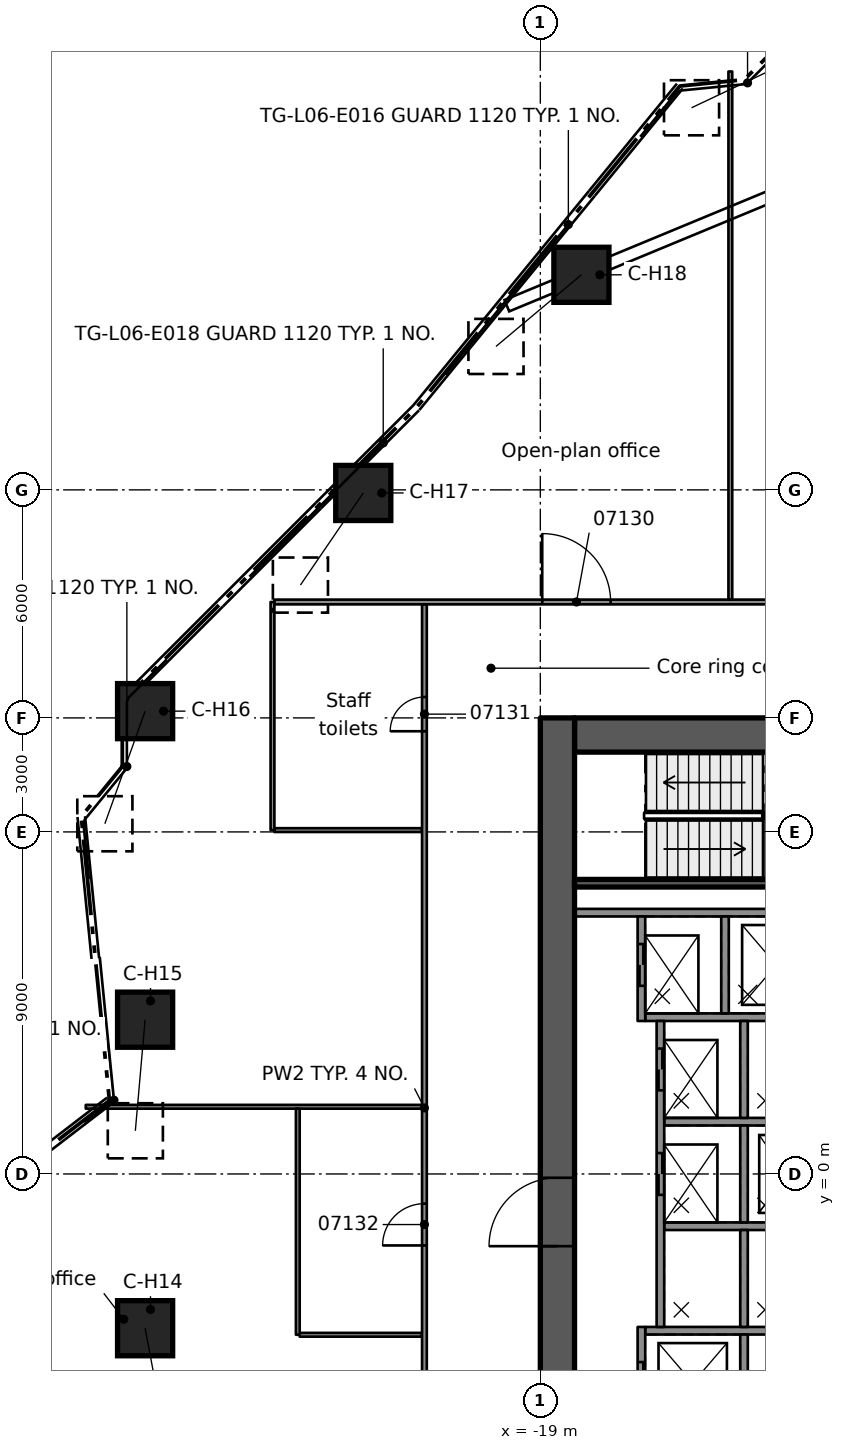
"""IFC4 building model, lengths in metres.
Left out: names, types, materials, properties, quantities, classifications, styles, units other than length and angle.
Written with IfcOpenShell. Run it as: python <this file> out.ifc"""

import sys

from ifc_helpers import new_model, si_unit, direction, frame, frame_2d, origin, origin_2d, place, context, subcontext, project, spatial, rectangle, extrude, element, fill, save


model = new_model("IFC4")
c1 = context("Model", 3, precision=1e-05, world=origin(), true_north=direction((0.0, 1.0)))
c2 = subcontext(c1, "Body", "Model", "MODEL_VIEW")
j1 = project(units=[si_unit("LENGTHUNIT", "METRE"), si_unit("PLANEANGLEUNIT", "RADIAN")], contexts=[c1])
p1 = place(None, origin())
s1 = spatial("IfcSite", under=j1, at=p1, CompositionType="ELEMENT")
p2 = place(p1, origin())
s2 = spatial("IfcBuilding", under=s1, at=p2, CompositionType="ELEMENT")
p3 = place(p2, frame((0.0, 0.0, 33.3)))
s3 = spatial("IfcBuildingStorey", under=s2, at=p3, CompositionType="ELEMENT", Elevation=33.3)
p4 = place(p3, frame((-18.1, 11.55, 0.0), z_axis=(0.0, 0.0, 1.0), x_axis=(1.0, 0.0, 0.0)))
e1 = element("IfcWall", 1, at=p4, inside=s3, PredefinedType="SHEAR", context=c2, shape_type="SweptSolid", body=[
    extrude(rectangle(XDim=9.2, YDim=0.9, at=frame_2d((4.6, 0.0))), origin(), (0.0, 0.0, 1.0), 4.0),
])
p5 = place(p4, frame((5.1, 0.0, 0.0)))
e2 = element("IfcOpeningElement", 2, at=p5, cuts=e1, PredefinedType="OPENING", context=c2, shape_type="SweptSolid", body=[
    extrude(rectangle(XDim=1.1, YDim=2.1, at=frame_2d((0.55, 1.05))), frame((0.0, 0.46, 0.0), z_axis=(0.0, -1.0, 0.0), x_axis=(1.0, 0.0, 0.0)), (0.0, 0.0, 1.0), 0.92),
])
p6 = place(p3, frame((-18.55, -12.0, 0.0), z_axis=(0.0, 0.0, 1.0), x_axis=(0.0, 1.0, 0.0)))
e3 = element("IfcWall", 3, at=p6, inside=s3, PredefinedType="SHEAR", context=c2, shape_type="SweptSolid", body=[
    extrude(rectangle(XDim=24.0, YDim=0.9, at=frame_2d((12.0, 0.0))), origin(), (0.0, 0.0, 1.0), 4.0),
])
p7 = place(p6, frame((10.1, 0.0, 0.0)))
e4 = element("IfcOpeningElement", 4, at=p7, cuts=e3, PredefinedType="OPENING", context=c2, shape_type="SweptSolid", body=[
    extrude(rectangle(XDim=1.8, YDim=2.1, at=frame_2d((0.9, 1.05))), frame((0.0, 0.46, 0.0), z_axis=(0.0, -1.0, 0.0), x_axis=(1.0, 0.0, 0.0)), (0.0, 0.0, 1.0), 0.92),
])
p8 = place(p3, frame((-29.4, -4.059, 0.508), z_axis=(0.130006651481, -0.68901191234, 0.712994288353), x_axis=(0.98266050942, 0.185413924034, 0.0)))
e5 = element("IfcColumn", 5, at=p8, inside=s3, PredefinedType="COLUMN", context=c2, shape_type="SweptSolid", body=[
    extrude(rectangle(XDim=1.45, YDim=1.45, at=origin_2d()), origin(), (0.0, 0.0, 1.0), 4.184),
])
p9 = place(p3, frame((-29.4, 4.059, 0.508), z_axis=(-0.061436713661, -0.698558188668, 0.712910925193), x_axis=(0.99615487667, -0.08760971228, 0.0)))
e6 = element("IfcColumn", 6, at=p9, inside=s3, PredefinedType="COLUMN", context=c2, shape_type="SweptSolid", body=[
    extrude(rectangle(XDim=1.45, YDim=1.45, at=origin_2d()), origin(), (0.0, 0.0, 1.0), 4.185),
])
p10 = place(p3, frame((-29.4, 12.178, 0.53), z_axis=(-0.24591316534, -0.687967306264, 0.682808685229), x_axis=(0.941650592778, -0.33659198018, 0.0)))
e7 = element("IfcColumn", 7, at=p10, inside=s3, PredefinedType="COLUMN", context=c2, shape_type="SweptSolid", body=[
    extrude(rectangle(XDim=1.45, YDim=1.45, at=origin_2d()), origin(), (0.0, 0.0, 1.0), 4.307),
])
p11 = place(p3, frame((-23.659, 17.919, 0.508), z_axis=(-0.395280825563, -0.579239562537, 0.712905742812), x_axis=(0.825998448397, -0.563672389997, 0.0)))
e8 = element("IfcColumn", 8, at=p11, inside=s3, PredefinedType="COLUMN", context=c2, shape_type="SweptSolid", body=[
    extrude(rectangle(XDim=1.45, YDim=1.45, at=origin_2d()), origin(), (0.0, 0.0, 1.0), 4.185),
])
p12 = place(p3, frame((-17.919, 23.659, 0.508), z_axis=(-0.537268679687, -0.450505155937, 0.713012952408), x_axis=(0.642522431446, -0.766266875891, 0.0)))
e9 = element("IfcColumn", 9, at=p12, inside=s3, PredefinedType="COLUMN", context=c2, shape_type="SweptSolid", body=[
    extrude(rectangle(XDim=1.45, YDim=1.45, at=origin_2d()), origin(), (0.0, 0.0, 1.0), 4.184),
])
p13 = place(p3, frame((-12.178, 29.4, 0.53), z_axis=(-0.660215598589, -0.312560635038, 0.682950373603), x_axis=(0.427892823623, -0.903829481424, 0.0)))
e10 = element("IfcColumn", 10, at=p13, inside=s3, PredefinedType="COLUMN", context=c2, shape_type="SweptSolid", body=[
    extrude(rectangle(XDim=1.45, YDim=1.45, at=origin_2d()), origin(), (0.0, 0.0, 1.0), 4.306),
])
p14 = place(p3, frame((-11.54, 6.875, 0.0), z_axis=(0.0, 0.0, 1.0), x_axis=(-1.0, 0.0, 0.0)))
e11 = element("IfcWall", 11, at=p14, inside=s3, PredefinedType="SOLIDWALL", context=c2, shape_type="SweptSolid", body=[
    extrude(rectangle(XDim=6.56, YDim=0.2, at=frame_2d((3.28, 0.0))), origin(), (0.0, 0.0, 1.0), 3.58),
])
p15 = place(p3, frame((-11.54, -4.125, 0.0), z_axis=(0.0, 0.0, 1.0), x_axis=(-1.0, 0.0, 0.0)))
e12 = element("IfcWall", 12, at=p15, inside=s3, PredefinedType="SOLIDWALL", context=c2, shape_type="SweptSolid", body=[
    extrude(rectangle(XDim=4.7, YDim=0.2, at=frame_2d((2.35, 0.0))), origin(), (0.0, 0.0, 1.0), 3.58),
])
for number, where, z_axis, x_axis in (
    (13, (-11.54, -1.375, 0.0), (0.0, 0.0, 1.0), (-1.0, 0.0, 0.0)),
    (14, (-11.54, 1.375, 0.0), (0.0, 0.0, 1.0), (-1.0, 0.0, 0.0)),
):
    element("IfcWall", number, at=place(p3, frame(where, z_axis=z_axis, x_axis=x_axis)), inside=s3, PredefinedType="SOLIDWALL", context=c2, shape_type="SweptSolid", body=[
        extrude(rectangle(XDim=4.2, YDim=0.2, at=frame_2d((2.1, 0.0))), origin(), (0.0, 0.0, 1.0), 3.58),
    ])
p16 = place(p3, frame((-11.54, 4.125, 0.0), z_axis=(0.0, 0.0, 1.0), x_axis=(-1.0, 0.0, 0.0)))
e15 = element("IfcWall", 15, at=p16, inside=s3, PredefinedType="SOLIDWALL", context=c2, shape_type="SweptSolid", body=[
    extrude(rectangle(XDim=4.7, YDim=0.2, at=frame_2d((2.35, 0.0))), origin(), (0.0, 0.0, 1.0), 3.58),
])
for number, where, z_axis, x_axis in (
    (16, (-13.64, -6.775, 0.0), (0.0, 0.0, 1.0), (0.0, 1.0, 0.0)),
    (17, (-13.64, -4.025, 0.0), (0.0, 0.0, 1.0), (0.0, 1.0, 0.0)),
    (18, (-13.64, -1.275, 0.0), (0.0, 0.0, 1.0), (0.0, 1.0, 0.0)),
    (19, (-13.64, 1.475, 0.0), (0.0, 0.0, 1.0), (0.0, 1.0, 0.0)),
    (20, (-14.14, 4.225, 0.0), (0.0, 0.0, 1.0), (0.0, 1.0, 0.0)),
):
    element("IfcWall", number, at=place(p3, frame(where, z_axis=z_axis, x_axis=x_axis)), inside=s3, PredefinedType="SOLIDWALL", context=c2, shape_type="SweptSolid", body=[
        extrude(rectangle(XDim=2.55, YDim=0.2, at=frame_2d((1.275, 0.0))), origin(), (0.0, 0.0, 1.0), 3.58),
    ])
p17 = place(p3, frame((-16.34, -6.775, 0.0), z_axis=(0.0, 0.0, 1.0), x_axis=(0.0, 1.0, 0.0)))
e21 = element("IfcWall", 21, at=p17, inside=s3, PredefinedType="SOLIDWALL", context=c2, shape_type="SweptSolid", body=[
    extrude(rectangle(XDim=2.75, YDim=0.2, at=frame_2d((1.375, 0.0))), origin(), (0.0, 0.0, 1.0), 3.58),
])
p18 = place(p17, frame((0.725, 0.0, 0.0)))
e22 = element("IfcOpeningElement", 22, at=p18, cuts=e21, PredefinedType="OPENING", context=c2, shape_type="SweptSolid", body=[
    extrude(rectangle(XDim=1.1, YDim=2.1, at=frame_2d((0.55, 1.05))), frame((0.0, 0.11, 0.0), z_axis=(0.0, -1.0, 0.0), x_axis=(1.0, 0.0, 0.0)), (0.0, 0.0, 1.0), 0.22),
])
p19 = place(p3, frame((-15.84, -4.025, 0.0), z_axis=(0.0, 0.0, 1.0), x_axis=(0.0, 1.0, 0.0)))
e23 = element("IfcWall", 23, at=p19, inside=s3, PredefinedType="SOLIDWALL", context=c2, shape_type="SweptSolid", body=[
    extrude(rectangle(XDim=8.05, YDim=0.2, at=frame_2d((4.025, 0.0))), origin(), (0.0, 0.0, 1.0), 3.58),
])
p20 = place(p19, frame((3.475, 0.0, 0.0)))
e24 = element("IfcOpeningElement", 24, at=p20, cuts=e23, PredefinedType="OPENING", context=c2, shape_type="SweptSolid", body=[
    extrude(rectangle(XDim=1.1, YDim=2.1, at=frame_2d((0.55, 1.05))), frame((0.0, 0.11, 0.0), z_axis=(0.0, -1.0, 0.0), x_axis=(1.0, 0.0, 0.0)), (0.0, 0.0, 1.0), 0.22),
])
p21 = place(p19, frame((6.225, 0.0, 0.0)))
e25 = element("IfcOpeningElement", 25, at=p21, cuts=e23, PredefinedType="OPENING", context=c2, shape_type="SweptSolid", body=[
    extrude(rectangle(XDim=1.1, YDim=2.1, at=frame_2d((0.55, 1.05))), frame((0.0, 0.11, 0.0), z_axis=(0.0, -1.0, 0.0), x_axis=(1.0, 0.0, 0.0)), (0.0, 0.0, 1.0), 0.22),
])
p22 = place(p3, frame((-16.34, 4.025, 0.0), z_axis=(0.0, 0.0, 1.0), x_axis=(0.0, 1.0, 0.0)))
e26 = element("IfcWall", 26, at=p22, inside=s3, PredefinedType="SOLIDWALL", context=c2, shape_type="SweptSolid", body=[
    extrude(rectangle(XDim=2.75, YDim=0.2, at=frame_2d((1.375, 0.0))), origin(), (0.0, 0.0, 1.0), 3.58),
])
p23 = place(p22, frame((0.925, 0.0, 0.0)))
e27 = element("IfcOpeningElement", 27, at=p23, cuts=e26, PredefinedType="OPENING", context=c2, shape_type="SweptSolid", body=[
    extrude(rectangle(XDim=1.1, YDim=2.1, at=frame_2d((0.55, 1.05))), frame((0.0, 0.11, 0.0), z_axis=(0.0, -1.0, 0.0), x_axis=(1.0, 0.0, 0.0)), (0.0, 0.0, 1.0), 0.22),
])
p24 = place(p3, frame((-11.54, 7.65, 0.0), z_axis=(0.0, 0.0, 1.0), x_axis=(-1.0, 0.0, 0.0)))
e28 = element("IfcWall", 28, at=p24, inside=s3, PredefinedType="SOLIDWALL", context=c2, shape_type="SweptSolid", body=[
    extrude(rectangle(XDim=6.56, YDim=0.2, at=frame_2d((3.28, 0.0))), origin(), (0.0, 0.0, 1.0), 3.58),
])
p25 = place(p3, frame((-36.678, -2.619, 0.0), z_axis=(0.0, 0.0, 1.0), x_axis=(0.608725798764, -0.793380679069, 0.0)))
e29 = element("IfcWall", 29, at=p25, inside=s3, PredefinedType="PARTITIONING", context=c2, shape_type="SweptSolid", body=[
    extrude(rectangle(XDim=15.256, YDim=0.1, at=frame_2d((7.628, 0.0))), origin(), (0.0, 0.0, 1.0), 3.56),
])
p26 = place(p3, frame((-25.332, -4.231, 0.0), z_axis=(0.0, 0.0, 1.0), x_axis=(1.0, 0.0, 0.0)))
e30 = element("IfcWall", 30, at=p26, inside=s3, PredefinedType="PARTITIONING", context=c2, shape_type="SweptSolid", body=[
    extrude(rectangle(XDim=3.219, YDim=0.1, at=frame_2d((1.609, 0.0))), origin(), (0.0, 0.0, 1.0), 3.56),
])
p27 = place(p3, frame((-30.961, 1.768, 0.0), z_axis=(0.0, 0.0, 1.0), x_axis=(1.0, 0.0, 0.0)))
e31 = element("IfcWall", 31, at=p27, inside=s3, PredefinedType="PARTITIONING", context=c2, shape_type="SweptSolid", body=[
    extrude(rectangle(XDim=8.848, YDim=0.1, at=frame_2d((4.424, 0.0))), origin(), (0.0, 0.0, 1.0), 3.56),
])
p28 = place(p3, frame((-25.998, 9.048, 0.0), z_axis=(0.0, 0.0, 1.0), x_axis=(1.0, 0.0, 0.0)))
e32 = element("IfcWall", 32, at=p28, inside=s3, PredefinedType="PARTITIONING", context=c2, shape_type="SweptSolid", body=[
    extrude(rectangle(XDim=3.885, YDim=0.1, at=frame_2d((1.942, 0.0))), origin(), (0.0, 0.0, 1.0), 3.56),
])
p29 = place(p3, frame((-25.998, 15.05, 0.0), z_axis=(0.0, 0.0, 1.0), x_axis=(1.0, 0.0, 0.0)))
e33 = element("IfcWall", 33, at=p29, inside=s3, PredefinedType="PARTITIONING", context=c2, shape_type="SweptSolid", body=[
    extrude(rectangle(XDim=15.007, YDim=0.125, at=frame_2d((7.503, 0.0))), origin(), (0.0, 0.0, 1.0), 3.56),
])
p30 = place(p29, frame((7.048, 0.0, 0.0)))
e34 = element("IfcOpeningElement", 34, at=p30, cuts=e33, PredefinedType="OPENING", context=c2, shape_type="SweptSolid", body=[
    extrude(rectangle(XDim=1.8, YDim=2.1, at=frame_2d((0.9, 1.05))), frame((0.0, 0.073, 0.0), z_axis=(0.0, -1.0, 0.0), x_axis=(1.0, 0.0, 0.0)), (0.0, 0.0, 1.0), 0.145),
])
p31 = place(p3, frame((-14.0, 15.114, 0.0), z_axis=(0.0, 0.0, 1.0), x_axis=(0.0, 1.0, 0.0)))
e35 = element("IfcWall", 35, at=p31, inside=s3, PredefinedType="PARTITIONING", context=c2, shape_type="SweptSolid", body=[
    extrude(rectangle(XDim=13.895, YDim=0.1, at=frame_2d((6.948, 0.0))), origin(), (0.0, 0.0, 1.0), 3.56),
])
p32 = place(p3, frame((-22.05, -11.511, 0.0), z_axis=(0.0, 0.0, 1.0), x_axis=(0.0, 1.0, 0.0)))
e36 = element("IfcWall", 36, at=p32, inside=s3, PredefinedType="PARTITIONING", context=c2, shape_type="SweptSolid", body=[
    extrude(rectangle(XDim=26.497, YDim=0.125, at=frame_2d((13.249, 0.0))), origin(), (0.0, 0.0, 1.0), 3.56),
])
p33 = place(p32, frame((23.16, 0.0, 0.0)))
e37 = element("IfcOpeningElement", 37, at=p33, cuts=e36, PredefinedType="OPENING", context=c2, shape_type="SweptSolid", body=[
    extrude(rectangle(XDim=0.9, YDim=2.1, at=frame_2d((0.45, 1.05))), frame((0.0, 0.073, 0.0), z_axis=(0.0, -1.0, 0.0), x_axis=(1.0, 0.0, 0.0)), (0.0, 0.0, 1.0), 0.145),
])
p34 = place(p32, frame((9.63, 0.0, 0.0)))
e38 = element("IfcOpeningElement", 38, at=p34, cuts=e36, PredefinedType="OPENING", context=c2, shape_type="SweptSolid", body=[
    extrude(rectangle(XDim=1.1, YDim=2.1, at=frame_2d((0.55, 1.05))), frame((0.0, 0.073, 0.0), z_axis=(0.0, -1.0, 0.0), x_axis=(1.0, 0.0, 0.0)), (0.0, 0.0, 1.0), 0.145),
])
p35 = place(p3, frame((-25.382, -4.231, 0.0), z_axis=(0.0, 0.0, 1.0), x_axis=(0.0, 1.0, 0.0)))
e39 = element("IfcWall", 39, at=p35, inside=s3, PredefinedType="PARTITIONING", context=c2, shape_type="SweptSolid", body=[
    extrude(rectangle(XDim=5.949, YDim=0.1, at=frame_2d((2.975, 0.0))), origin(), (0.0, 0.0, 1.0), 3.56),
])
p36 = place(p3, frame((-26.048, 9.048, 0.0), z_axis=(0.0, 0.0, 1.0), x_axis=(0.0, 1.0, 0.0)))
e40 = element("IfcWall", 40, at=p36, inside=s3, PredefinedType="PARTITIONING", context=c2, shape_type="SweptSolid", body=[
    extrude(rectangle(XDim=6.002, YDim=0.1, at=frame_2d((3.001, 0.0))), origin(), (0.0, 0.0, 1.0), 3.56),
])
p37 = place(p18, origin())
e41 = element("IfcDoor", 41, at=p37, inside=s3, OperationType="DOUBLE_DOOR_SLIDING", PredefinedType="DOOR", context=c2, shape_type="SweptSolid", body=[
    extrude(rectangle(XDim=1.1, YDim=2.1, at=frame_2d((0.55, 1.05))), frame((0.0, 0.025, 0.0), z_axis=(0.0, -1.0, 0.0), x_axis=(1.0, 0.0, 0.0)), (0.0, 0.0, 1.0), 0.05),
])
fill(e22, e41)
p38 = place(p20, origin())
e42 = element("IfcDoor", 42, at=p38, inside=s3, OperationType="DOUBLE_DOOR_SLIDING", PredefinedType="DOOR", context=c2, shape_type="SweptSolid", body=[
    extrude(rectangle(XDim=1.1, YDim=2.1, at=frame_2d((0.55, 1.05))), frame((0.0, 0.025, 0.0), z_axis=(0.0, -1.0, 0.0), x_axis=(1.0, 0.0, 0.0)), (0.0, 0.0, 1.0), 0.05),
])
fill(e24, e42)
p39 = place(p21, origin())
e43 = element("IfcDoor", 43, at=p39, inside=s3, OperationType="DOUBLE_DOOR_SLIDING", PredefinedType="DOOR", context=c2, shape_type="SweptSolid", body=[
    extrude(rectangle(XDim=1.1, YDim=2.1, at=frame_2d((0.55, 1.05))), frame((0.0, 0.025, 0.0), z_axis=(0.0, -1.0, 0.0), x_axis=(1.0, 0.0, 0.0)), (0.0, 0.0, 1.0), 0.05),
])
fill(e25, e43)
p40 = place(p23, origin())
e44 = element("IfcDoor", 44, at=p40, inside=s3, OperationType="DOUBLE_DOOR_SLIDING", PredefinedType="DOOR", context=c2, shape_type="SweptSolid", body=[
    extrude(rectangle(XDim=1.1, YDim=2.1, at=frame_2d((0.55, 1.05))), frame((0.0, 0.025, 0.0), z_axis=(0.0, -1.0, 0.0), x_axis=(1.0, 0.0, 0.0)), (0.0, 0.0, 1.0), 0.05),
])
fill(e27, e44)
p41 = place(p7, origin())
e45 = element("IfcDoor", 45, at=p41, inside=s3, OperationType="SINGLE_SWING_LEFT", PredefinedType="DOOR", context=c2, shape_type="SweptSolid", body=[
    extrude(rectangle(XDim=1.8, YDim=2.1, at=frame_2d((0.9, 1.05))), frame((0.0, 0.025, 0.0), z_axis=(0.0, -1.0, 0.0), x_axis=(1.0, 0.0, 0.0)), (0.0, 0.0, 1.0), 0.05),
])
fill(e4, e45)
p42 = place(p30, origin())
e46 = element("IfcDoor", 46, at=p42, inside=s3, OperationType="DOUBLE_DOOR_SINGLE_SWING", PredefinedType="DOOR", context=c2, shape_type="SweptSolid", body=[
    extrude(rectangle(XDim=1.8, YDim=2.1, at=frame_2d((0.9, 1.05))), frame((0.0, 0.025, 0.0), z_axis=(0.0, -1.0, 0.0), x_axis=(1.0, 0.0, 0.0)), (0.0, 0.0, 1.0), 0.05),
])
fill(e34, e46)
p43 = place(p33, origin())
e47 = element("IfcDoor", 47, at=p43, inside=s3, OperationType="SINGLE_SWING_RIGHT", PredefinedType="DOOR", context=c2, shape_type="SweptSolid", body=[
    extrude(rectangle(XDim=0.9, YDim=2.1, at=frame_2d((0.45, 1.05))), frame((0.0, 0.025, 0.0), z_axis=(0.0, -1.0, 0.0), x_axis=(1.0, 0.0, 0.0)), (0.0, 0.0, 1.0), 0.05),
])
fill(e37, e47)
p44 = place(p34, origin())
e48 = element("IfcDoor", 48, at=p44, inside=s3, OperationType="SINGLE_SWING_LEFT", PredefinedType="DOOR", context=c2, shape_type="SweptSolid", body=[
    extrude(rectangle(XDim=1.1, YDim=2.1, at=frame_2d((0.55, 1.05))), frame((0.0, 0.025, 0.0), z_axis=(0.0, -1.0, 0.0), x_axis=(1.0, 0.0, 0.0)), (0.0, 0.0, 1.0), 0.05),
])
fill(e38, e48)
save(model, sys.argv[1])
